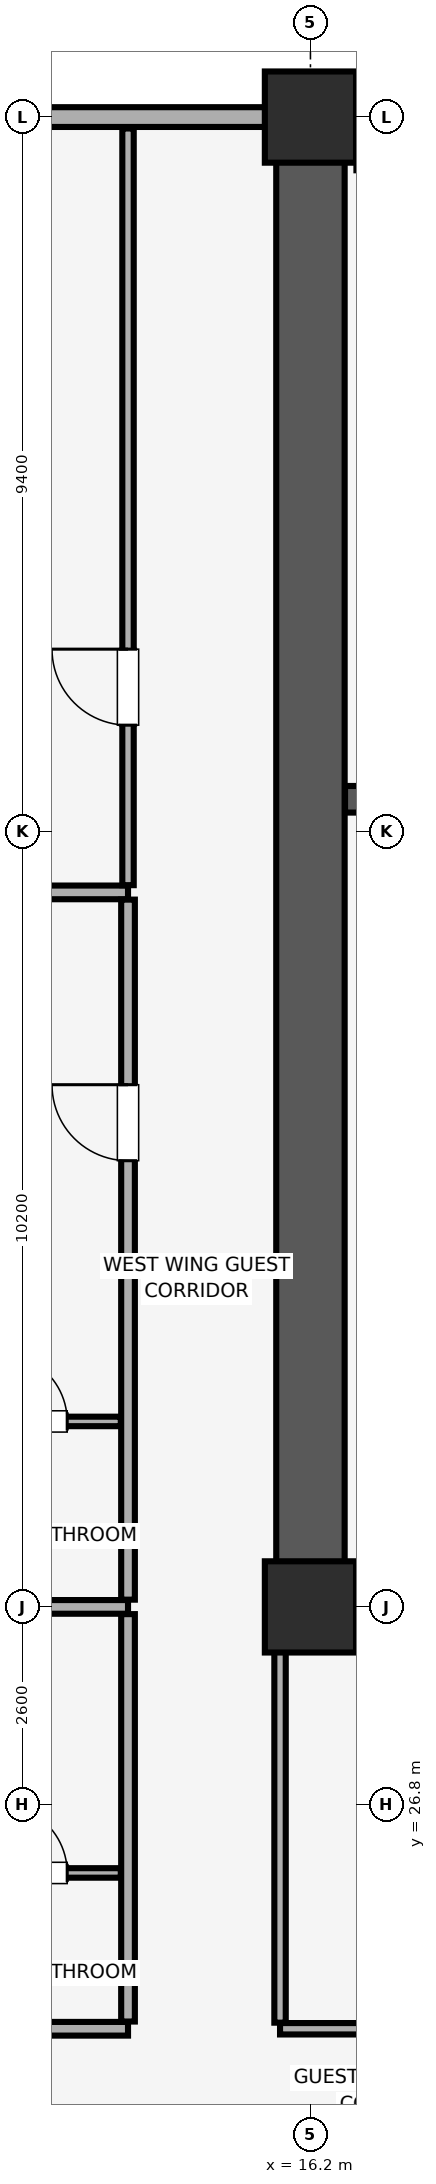
"""IFC4 building model, lengths in metres.
Left out: names, types, materials, properties, quantities, classifications, styles, units other than length and angle.
Written with IfcOpenShell. Run it as: python <this file> out.ifc"""

import sys

from ifc_helpers import new_model, si_unit, direction, frame, frame_2d, origin, origin_2d, place, context, subcontext, project, spatial, rectangle, extrude, element, fill, save


model = new_model("IFC4")
c1 = context("Model", 3, precision=1e-05, world=origin(), true_north=direction((0.0, 1.0)))
c2 = subcontext(c1, "Body", "Model", "MODEL_VIEW")
j1 = project(units=[si_unit("LENGTHUNIT", "METRE"), si_unit("PLANEANGLEUNIT", "RADIAN")], contexts=[c1])
p1 = place(None, origin())
s1 = spatial("IfcSite", under=j1, at=p1, CompositionType="ELEMENT")
p2 = place(p1, origin())
s2 = spatial("IfcBuilding", under=s1, at=p2, CompositionType="ELEMENT")
p3 = place(p2, frame((0.0, 0.0, 104.3)))
s3 = spatial("IfcBuildingStorey", under=s2, at=p3, CompositionType="ELEMENT", Elevation=104.3)
for number, where, z_axis, x_axis in (
    (1, (16.2, 29.4, 0.0), (0.0, 0.0, 1.0), (1.0, 0.0, 0.0)),
    (2, (16.2, 49.0, 0.0), (0.0, 0.0, 1.0), (1.0, 0.0, 0.0)),
):
    element("IfcColumn", number, at=place(p3, frame(where, z_axis=z_axis, x_axis=x_axis)), inside=s3, PredefinedType="COLUMN", context=c2, shape_type="SweptSolid", body=[
        extrude(rectangle(XDim=1.2, YDim=1.2, at=origin_2d()), origin(), (0.0, 0.0, 1.0), 3.51),
    ])
p4 = place(p3, frame((79.8, 49.0, 0.0), z_axis=(0.0, 0.0, 1.0), x_axis=(-1.0, 0.0, 0.0)))
e3 = element("IfcWall", 3, at=p4, inside=s3, PredefinedType="SOLIDWALL", context=c2, shape_type="SweptSolid", body=[
    extrude(rectangle(XDim=75.6, YDim=0.26, at=frame_2d((37.8, 0.0))), origin(), (0.0, 0.0, 1.0), 2.56),
])
p5 = place(p4, frame((72.565, 0.0, 0.85)))
e4 = element("IfcOpeningElement", 4, at=p5, cuts=e3, PredefinedType="OPENING", context=c2, shape_type="SweptSolid", body=[
    extrude(rectangle(XDim=1.5, YDim=1.4, at=frame_2d((0.75, 0.7))), frame((0.0, 0.14, 0.0), z_axis=(0.0, -1.0, 0.0), x_axis=(1.0, 0.0, 0.0)), (0.0, 0.0, 1.0), 0.28),
])
p6 = place(p4, frame((67.45, 0.0, 0.85)))
e5 = element("IfcOpeningElement", 5, at=p6, cuts=e3, PredefinedType="OPENING", context=c2, shape_type="SweptSolid", body=[
    extrude(rectangle(XDim=1.5, YDim=1.4, at=frame_2d((0.75, 0.7))), frame((0.0, 0.14, 0.0), z_axis=(0.0, -1.0, 0.0), x_axis=(1.0, 0.0, 0.0)), (0.0, 0.0, 1.0), 0.28),
])
p7 = place(p4, frame((6.65, 0.0, 0.85)))
e6 = element("IfcOpeningElement", 6, at=p7, cuts=e3, PredefinedType="OPENING", context=c2, shape_type="SweptSolid", body=[
    extrude(rectangle(XDim=1.5, YDim=1.4, at=frame_2d((0.75, 0.7))), frame((0.0, 0.14, 0.0), z_axis=(0.0, -1.0, 0.0), x_axis=(1.0, 0.0, 0.0)), (0.0, 0.0, 1.0), 0.28),
])
p8 = place(p4, frame((1.535, 0.0, 0.85)))
e7 = element("IfcOpeningElement", 7, at=p8, cuts=e3, PredefinedType="OPENING", context=c2, shape_type="SweptSolid", body=[
    extrude(rectangle(XDim=1.5, YDim=1.4, at=frame_2d((0.75, 0.7))), frame((0.0, 0.14, 0.0), z_axis=(0.0, -1.0, 0.0), x_axis=(1.0, 0.0, 0.0)), (0.0, 0.0, 1.0), 0.28),
])
p9 = place(p4, frame((51.365, 0.0, 0.9)))
e8 = element("IfcOpeningElement", 8, at=p9, cuts=e3, PredefinedType="OPENING", context=c2, shape_type="SweptSolid", body=[
    extrude(rectangle(XDim=1.5, YDim=1.4, at=frame_2d((0.75, 0.7))), frame((0.0, 0.14, 0.0), z_axis=(0.0, -1.0, 0.0), x_axis=(1.0, 0.0, 0.0)), (0.0, 0.0, 1.0), 0.28),
])
p10 = place(p4, frame((46.0, 0.0, 0.9)))
e9 = element("IfcOpeningElement", 9, at=p10, cuts=e3, PredefinedType="OPENING", context=c2, shape_type="SweptSolid", body=[
    extrude(rectangle(XDim=1.5, YDim=1.4, at=frame_2d((0.75, 0.7))), frame((0.0, 0.14, 0.0), z_axis=(0.0, -1.0, 0.0), x_axis=(1.0, 0.0, 0.0)), (0.0, 0.0, 1.0), 0.28),
])
p11 = place(p4, frame((29.15, 0.0, 0.9)))
e10 = element("IfcOpeningElement", 10, at=p11, cuts=e3, PredefinedType="OPENING", context=c2, shape_type="SweptSolid", body=[
    extrude(rectangle(XDim=1.5, YDim=1.4, at=frame_2d((0.75, 0.7))), frame((0.0, 0.14, 0.0), z_axis=(0.0, -1.0, 0.0), x_axis=(1.0, 0.0, 0.0)), (0.0, 0.0, 1.0), 0.28),
])
p12 = place(p4, frame((23.485, 0.0, 0.9)))
e11 = element("IfcOpeningElement", 11, at=p12, cuts=e3, PredefinedType="OPENING", context=c2, shape_type="SweptSolid", body=[
    extrude(rectangle(XDim=1.5, YDim=1.4, at=frame_2d((0.75, 0.7))), frame((0.0, 0.14, 0.0), z_axis=(0.0, -1.0, 0.0), x_axis=(1.0, 0.0, 0.0)), (0.0, 0.0, 1.0), 0.28),
])
p13 = place(p3, frame((16.2, 29.4, 0.0), z_axis=(0.0, 0.0, 1.0), x_axis=(0.0, 1.0, 0.0)))
e12 = element("IfcWall", 12, at=p13, inside=s3, PredefinedType="SHEAR", context=c2, shape_type="SweptSolid", body=[
    extrude(rectangle(XDim=19.2, YDim=0.9, at=frame_2d((9.6, 0.0))), origin(), (0.0, 0.0, 1.0), 3.51),
])
p14 = place(p3, frame((16.655, 29.4, 0.0), z_axis=(0.0, 0.0, 1.0), x_axis=(1.0, 0.0, 0.0)))
e13 = element("IfcWall", 13, at=p14, inside=s3, PredefinedType="SHEAR", context=c2, shape_type="SweptSolid", body=[
    extrude(rectangle(XDim=6.945, YDim=0.9, at=frame_2d((3.473, 0.0))), origin(), (0.0, 0.0, 1.0), 3.51),
])
p15 = place(p3, frame((16.655, 40.025, 0.0), z_axis=(0.0, 0.0, 1.0), x_axis=(1.0, 0.0, 0.0)))
e14 = element("IfcWall", 14, at=p15, inside=s3, PredefinedType="SHEAR", context=c2, shape_type="SweptSolid", body=[
    extrude(rectangle(XDim=4.2, YDim=0.35, at=frame_2d((2.1, 0.0))), origin(), (0.0, 0.0, 1.0), 3.51),
])
p16 = place(p15, frame((1.81, 0.0, 0.0)))
e15 = element("IfcOpeningElement", 15, at=p16, cuts=e14, PredefinedType="OPENING", context=c2, shape_type="SweptSolid", body=[
    extrude(rectangle(XDim=1.15, YDim=2.15, at=frame_2d((0.575, 1.075))), frame((0.0, 0.185, 0.0), z_axis=(0.0, -1.0, 0.0), x_axis=(1.0, 0.0, 0.0)), (0.0, 0.0, 1.0), 0.37),
])
p17 = place(p3, frame((15.8, 23.85, 0.0), z_axis=(0.0, 0.0, 1.0), x_axis=(1.0, 0.0, 0.0)))
e16 = element("IfcWall", 16, at=p17, inside=s3, PredefinedType="PARTITIONING", context=c2, shape_type="SweptSolid", body=[
    extrude(rectangle(XDim=13.2, YDim=0.15, at=frame_2d((6.6, 0.0))), origin(), (0.0, 0.0, 1.0), 3.51),
])
p18 = place(p17, frame((5.6, 0.0, 0.0)))
e17 = element("IfcOpeningElement", 17, at=p18, cuts=e16, PredefinedType="OPENING", context=c2, shape_type="SweptSolid", body=[
    extrude(rectangle(XDim=1.0, YDim=2.15, at=frame_2d((0.5, 1.075))), frame((0.0, 0.085, 0.0), z_axis=(0.0, -1.0, 0.0), x_axis=(1.0, 0.0, 0.0)), (0.0, 0.0, 1.0), 0.17),
])
p19 = place(p3, frame((15.8, 23.93, 0.0), z_axis=(0.0, 0.0, 1.0), x_axis=(0.0, 1.0, 0.0)))
e18 = element("IfcWall", 18, at=p19, inside=s3, PredefinedType="PARTITIONING", context=c2, shape_type="SweptSolid", body=[
    extrude(rectangle(XDim=5.46, YDim=0.15, at=frame_2d((2.73, 0.0))), origin(), (0.0, 0.0, 1.0), 3.51),
])
p20 = place(p3, frame((0.15, 23.85, 0.0), z_axis=(0.0, 0.0, 1.0), x_axis=(1.0, 0.0, 0.0)))
e19 = element("IfcWall", 19, at=p20, inside=s3, PredefinedType="PARTITIONING", context=c2, shape_type="SweptSolid", body=[
    extrude(rectangle(XDim=13.65, YDim=0.18, at=frame_2d((6.825, 0.0))), origin(), (0.0, 0.0, 1.0), 3.51),
])
p21 = place(p20, frame((5.685, 0.0, 0.0)))
e20 = element("IfcOpeningElement", 20, at=p21, cuts=e19, PredefinedType="OPENING", context=c2, shape_type="SweptSolid", body=[
    extrude(rectangle(XDim=1.0, YDim=2.15, at=frame_2d((0.5, 1.075))), frame((0.0, 0.1, 0.0), z_axis=(0.0, -1.0, 0.0), x_axis=(1.0, 0.0, 0.0)), (0.0, 0.0, 1.0), 0.2),
])
p22 = place(p3, frame((0.15, 29.4, 0.0), z_axis=(0.0, 0.0, 1.0), x_axis=(1.0, 0.0, 0.0)))
e21 = element("IfcWall", 21, at=p22, inside=s3, PredefinedType="PARTITIONING", context=c2, shape_type="SweptSolid", body=[
    extrude(rectangle(XDim=13.65, YDim=0.18, at=frame_2d((6.825, 0.0))), origin(), (0.0, 0.0, 1.0), 2.86),
])
p23 = place(p3, frame((13.8, 23.945, 0.0), z_axis=(0.0, 0.0, 1.0), x_axis=(0.0, 1.0, 0.0)))
e22 = element("IfcWall", 22, at=p23, inside=s3, PredefinedType="PARTITIONING", context=c2, shape_type="SweptSolid", body=[
    extrude(rectangle(XDim=5.36, YDim=0.18, at=frame_2d((2.68, 0.0))), origin(), (0.0, 0.0, 1.0), 3.51),
])
p24 = place(p3, frame((11.3, 25.9, 0.0), z_axis=(0.0, 0.0, 1.0), x_axis=(1.0, 0.0, 0.0)))
e23 = element("IfcWall", 23, at=p24, inside=s3, PredefinedType="PARTITIONING", context=c2, shape_type="SweptSolid", body=[
    extrude(rectangle(XDim=2.405, YDim=0.125, at=frame_2d((1.203, 0.0))), origin(), (0.0, 0.0, 1.0), 3.51),
])
p25 = place(p24, frame((0.8, 0.0, 0.0)))
e24 = element("IfcOpeningElement", 24, at=p25, cuts=e23, PredefinedType="OPENING", context=c2, shape_type="SweptSolid", body=[
    extrude(rectangle(XDim=0.9, YDim=2.1, at=frame_2d((0.45, 1.05))), frame((0.0, 0.073, 0.0), z_axis=(0.0, -1.0, 0.0), x_axis=(1.0, 0.0, 0.0)), (0.0, 0.0, 1.0), 0.145),
])
p26 = place(p3, frame((0.15, 38.8, 0.0), z_axis=(0.0, 0.0, 1.0), x_axis=(1.0, 0.0, 0.0)))
e25 = element("IfcWall", 25, at=p26, inside=s3, PredefinedType="PARTITIONING", context=c2, shape_type="SweptSolid", body=[
    extrude(rectangle(XDim=13.65, YDim=0.18, at=frame_2d((6.825, 0.0))), origin(), (0.0, 0.0, 1.0), 3.51),
])
p27 = place(p3, frame((13.8, 29.495, 0.0), z_axis=(0.0, 0.0, 1.0), x_axis=(0.0, 1.0, 0.0)))
e26 = element("IfcWall", 26, at=p27, inside=s3, PredefinedType="PARTITIONING", context=c2, shape_type="SweptSolid", body=[
    extrude(rectangle(XDim=9.21, YDim=0.18, at=frame_2d((4.605, 0.0))), origin(), (0.0, 0.0, 1.0), 3.51),
])
p28 = place(p27, frame((5.775, 0.0, 0.0)))
e27 = element("IfcOpeningElement", 27, at=p28, cuts=e26, PredefinedType="OPENING", context=c2, shape_type="SweptSolid", body=[
    extrude(rectangle(XDim=1.0, YDim=2.15, at=frame_2d((0.5, 1.075))), frame((0.0, 0.1, 0.0), z_axis=(0.0, -1.0, 0.0), x_axis=(1.0, 0.0, 0.0)), (0.0, 0.0, 1.0), 0.2),
])
p29 = place(p3, frame((11.3, 31.84, 0.0), z_axis=(0.0, 0.0, 1.0), x_axis=(1.0, 0.0, 0.0)))
e28 = element("IfcWall", 28, at=p29, inside=s3, PredefinedType="PARTITIONING", context=c2, shape_type="SweptSolid", body=[
    extrude(rectangle(XDim=2.405, YDim=0.125, at=frame_2d((1.203, 0.0))), origin(), (0.0, 0.0, 1.0), 3.51),
])
p30 = place(p29, frame((0.8, 0.0, 0.0)))
e29 = element("IfcOpeningElement", 29, at=p30, cuts=e28, PredefinedType="OPENING", context=c2, shape_type="SweptSolid", body=[
    extrude(rectangle(XDim=0.9, YDim=2.1, at=frame_2d((0.45, 1.05))), frame((0.0, 0.073, 0.0), z_axis=(0.0, -1.0, 0.0), x_axis=(1.0, 0.0, 0.0)), (0.0, 0.0, 1.0), 0.145),
])
p31 = place(p3, frame((13.8, 38.895, 0.0), z_axis=(0.0, 0.0, 1.0), x_axis=(0.0, 1.0, 0.0)))
e30 = element("IfcWall", 30, at=p31, inside=s3, PredefinedType="PARTITIONING", context=c2, shape_type="SweptSolid", body=[
    extrude(rectangle(XDim=9.955, YDim=0.15, at=frame_2d((4.978, 0.0))), origin(), (0.0, 0.0, 1.0), 3.51),
])
p32 = place(p31, frame((2.105, 0.0, 0.0)))
e31 = element("IfcOpeningElement", 31, at=p32, cuts=e30, PredefinedType="OPENING", context=c2, shape_type="SweptSolid", body=[
    extrude(rectangle(XDim=1.0, YDim=2.15, at=frame_2d((0.5, 1.075))), frame((0.0, 0.085, 0.0), z_axis=(0.0, -1.0, 0.0), x_axis=(1.0, 0.0, 0.0)), (0.0, 0.0, 1.0), 0.17),
])
p33 = place(p25, origin())
e32 = element("IfcDoor", 32, at=p33, inside=s3, OperationType="SINGLE_SWING_LEFT", PredefinedType="DOOR", context=c2, shape_type="SweptSolid", body=[
    extrude(rectangle(XDim=0.9, YDim=2.1, at=frame_2d((0.45, 1.05))), frame((0.0, 0.025, 0.0), z_axis=(0.0, -1.0, 0.0), x_axis=(1.0, 0.0, 0.0)), (0.0, 0.0, 1.0), 0.05),
])
fill(e24, e32)
p34 = place(p28, origin())
e33 = element("IfcDoor", 33, at=p34, inside=s3, OperationType="SINGLE_SWING_RIGHT", PredefinedType="DOOR", context=c2, shape_type="SweptSolid", body=[
    extrude(rectangle(XDim=1.0, YDim=2.15, at=frame_2d((0.5, 1.075))), frame((0.0, 0.025, 0.0), z_axis=(0.0, -1.0, 0.0), x_axis=(1.0, 0.0, 0.0)), (0.0, 0.0, 1.0), 0.05),
])
fill(e27, e33)
p35 = place(p30, origin())
e34 = element("IfcDoor", 34, at=p35, inside=s3, OperationType="SINGLE_SWING_LEFT", PredefinedType="DOOR", context=c2, shape_type="SweptSolid", body=[
    extrude(rectangle(XDim=0.9, YDim=2.1, at=frame_2d((0.45, 1.05))), frame((0.0, 0.025, 0.0), z_axis=(0.0, -1.0, 0.0), x_axis=(1.0, 0.0, 0.0)), (0.0, 0.0, 1.0), 0.05),
])
fill(e29, e34)
p36 = place(p32, origin())
e35 = element("IfcDoor", 35, at=p36, inside=s3, OperationType="SINGLE_SWING_RIGHT", PredefinedType="DOOR", context=c2, shape_type="SweptSolid", body=[
    extrude(rectangle(XDim=1.0, YDim=2.15, at=frame_2d((0.5, 1.075))), frame((0.0, 0.025, 0.0), z_axis=(0.0, -1.0, 0.0), x_axis=(1.0, 0.0, 0.0)), (0.0, 0.0, 1.0), 0.05),
])
fill(e31, e35)
save(model, sys.argv[1])
